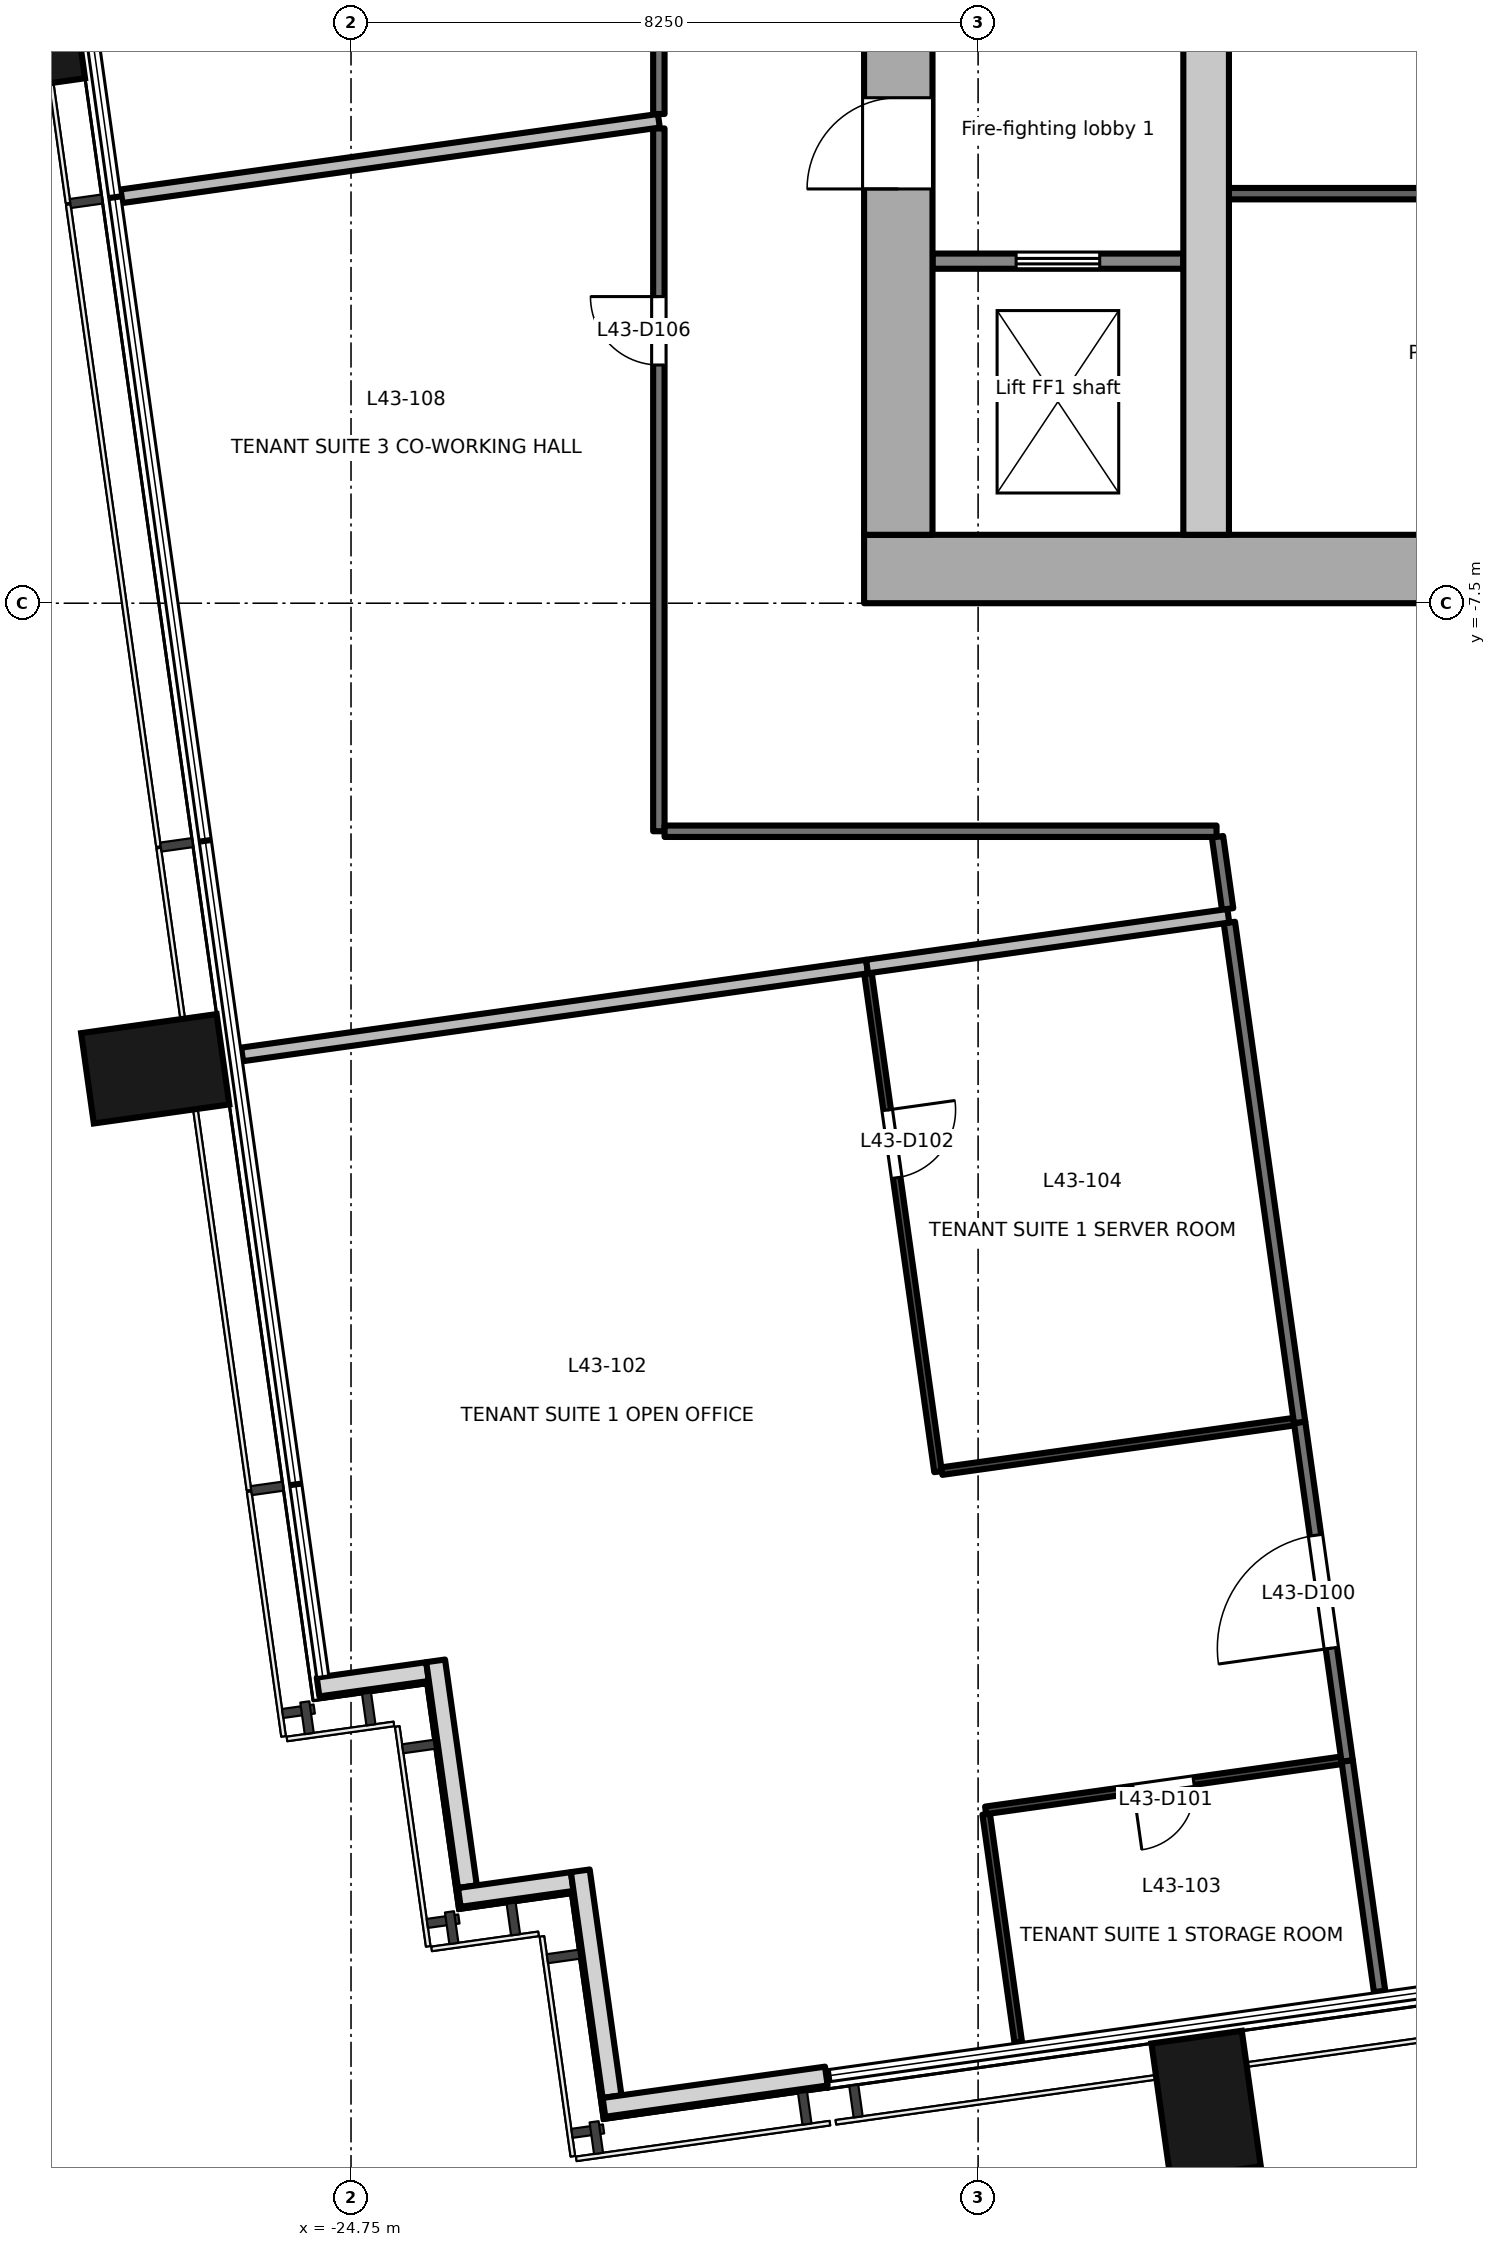
"""IFC4 building model, lengths in metres.
Left out: names, types, materials, properties, quantities, classifications, styles, units other than length and angle.
Written with IfcOpenShell. Run it as: python <this file> out.ifc"""

import sys

from ifc_helpers import new_model, si_unit, direction, frame, frame_2d, origin, origin_2d, place, context, subcontext, project, spatial, rectangle, extrude, element, fill, save


model = new_model("IFC4")
c1 = context("Model", 3, precision=1e-05, world=origin(), true_north=direction((0.0, 1.0)))
c2 = subcontext(c1, "Body", "Model", "MODEL_VIEW")
j1 = project(units=[si_unit("LENGTHUNIT", "METRE"), si_unit("PLANEANGLEUNIT", "RADIAN")], contexts=[c1])
p1 = place(None, origin())
s1 = spatial("IfcSite", under=j1, at=p1, CompositionType="ELEMENT")
p2 = place(p1, origin())
s2 = spatial("IfcBuilding", under=s1, at=p2, CompositionType="ELEMENT")
p3 = place(p2, frame((0.0, 0.0, 188.0)))
s3 = spatial("IfcBuildingStorey", under=s2, at=p3, CompositionType="ELEMENT", Elevation=188.0)
for number, where, z_axis, x_axis in (
    (1, (-13.5, -27.256, -0.2), (0.0, 0.0, 1.0), (0.99, 0.139, 0.0)),
    (2, (-27.326, -13.625, -0.2), (0.0, 0.0, 1.0), (-0.139, 0.99, 0.0)),
    (3, (-29.224, -0.125, -0.2), (0.0, 0.0, 1.0), (-0.139, 0.99, 0.0)),
):
    element("IfcColumn", number, at=place(p3, frame(where, z_axis=z_axis, x_axis=x_axis)), inside=s3, PredefinedType="COLUMN", context=c2, shape_type="SweptSolid", body=[
        extrude(rectangle(XDim=1.2, YDim=1.8, at=origin_2d()), origin(), (0.0, 0.0, 1.0), 3.9),
    ])
p4 = place(p3, frame((-25.184, -21.758, 0.0), z_axis=(0.0, 0.0, 1.0), x_axis=(0.9902493448, 0.13930626376, 0.0)))
e4 = element("IfcWall", 4, at=p4, inside=s3, PredefinedType="SOLIDWALL", context=c2, shape_type="SweptSolid", body=[
    extrude(rectangle(XDim=1.455, YDim=0.25, at=frame_2d((0.727, 0.0))), origin(), (0.0, 0.0, 1.0), 3.7),
])
p5 = place(p3, frame((-23.637, -21.414, 0.0), z_axis=(0.0, 0.0, 1.0), x_axis=(0.139313431826, -0.990248336385, 0.0)))
e5 = element("IfcWall", 5, at=p5, inside=s3, PredefinedType="SOLIDWALL", context=c2, shape_type="SweptSolid", body=[
    extrude(rectangle(XDim=3.0, YDim=0.25, at=frame_2d((1.5, 0.0))), origin(), (0.0, 0.0, 1.0), 3.7),
])
p6 = place(p3, frame((-23.325, -24.526, 0.0), z_axis=(0.0, 0.0, 1.0), x_axis=(0.990243596651, 0.13934711799, 0.0)))
e6 = element("IfcWall", 6, at=p6, inside=s3, PredefinedType="SOLIDWALL", context=c2, shape_type="SweptSolid", body=[
    extrude(rectangle(XDim=1.5, YDim=0.25, at=frame_2d((0.75, 0.0))), origin(), (0.0, 0.0, 1.0), 3.7),
])
p7 = place(p3, frame((-21.734, -24.176, 0.0), z_axis=(0.0, 0.0, 1.0), x_axis=(0.139313431826, -0.990248336385, 0.0)))
e7 = element("IfcWall", 7, at=p7, inside=s3, PredefinedType="SOLIDWALL", context=c2, shape_type="SweptSolid", body=[
    extrude(rectangle(XDim=3.0, YDim=0.25, at=frame_2d((1.5, 0.0))), origin(), (0.0, 0.0, 1.0), 3.7),
])
p8 = place(p3, frame((-21.422, -27.288, 0.0), z_axis=(0.0, 0.0, 1.0), x_axis=(0.990246427036, 0.139327002919, 0.0)))
e8 = element("IfcWall", 8, at=p8, inside=s3, PredefinedType="SOLIDWALL", context=c2, shape_type="SweptSolid", body=[
    extrude(rectangle(XDim=2.954, YDim=0.25, at=frame_2d((1.477, 0.0))), origin(), (0.0, 0.0, 1.0), 3.7),
])
p9 = place(p3, frame((-18.0, -7.05, -0.2), z_axis=(0.0, 0.0, 1.0), x_axis=(1.0, 0.0, 0.0)))
e9 = element("IfcWall", 9, at=p9, inside=s3, PredefinedType="SHEAR", context=c2, shape_type="SweptSolid", body=[
    extrude(rectangle(XDim=36.0, YDim=0.9, at=frame_2d((18.0, 0.0))), origin(), (0.0, 0.0, 1.0), 3.9),
])
p10 = place(p9, frame((11.3, 0.0, 0.2)))
e10 = element("IfcOpeningElement", 10, at=p10, cuts=e9, PredefinedType="OPENING", context=c2, shape_type="SweptSolid", body=[
    extrude(rectangle(XDim=1.8, YDim=2.1, at=frame_2d((0.9, 1.05))), frame((0.0, 0.46, 0.0), z_axis=(0.0, -1.0, 0.0), x_axis=(1.0, 0.0, 0.0)), (0.0, 0.0, 1.0), 0.921),
])
p11 = place(p9, frame((16.8, 0.0, 0.2)))
e11 = element("IfcOpeningElement", 11, at=p11, cuts=e9, PredefinedType="OPENING", context=c2, shape_type="SweptSolid", body=[
    extrude(rectangle(XDim=2.4, YDim=2.1, at=frame_2d((1.2, 1.05))), frame((0.0, 0.46, 0.0), z_axis=(0.0, -1.0, 0.0), x_axis=(1.0, 0.0, 0.0)), (0.0, 0.0, 1.0), 0.921),
])
p12 = place(p9, frame((26.1, 0.0, 0.2)))
e12 = element("IfcOpeningElement", 12, at=p12, cuts=e9, PredefinedType="OPENING", context=c2, shape_type="SweptSolid", body=[
    extrude(rectangle(XDim=2.4, YDim=2.1, at=frame_2d((1.2, 1.05))), frame((0.0, 0.46, 0.0), z_axis=(0.0, -1.0, 0.0), x_axis=(1.0, 0.0, 0.0)), (0.0, 0.0, 1.0), 0.921),
])
p13 = place(p3, frame((-17.55, -6.6, -0.2), z_axis=(0.0, 0.0, 1.0), x_axis=(0.0, 1.0, 0.0)))
e13 = element("IfcWall", 13, at=p13, inside=s3, PredefinedType="SHEAR", context=c2, shape_type="SweptSolid", body=[
    extrude(rectangle(XDim=13.2, YDim=0.9, at=frame_2d((6.6, 0.0))), origin(), (0.0, 0.0, 1.0), 3.9),
])
p14 = place(p13, frame((4.55, 0.0, 0.2)))
e14 = element("IfcOpeningElement", 14, at=p14, cuts=e13, PredefinedType="OPENING", context=c2, shape_type="SweptSolid", body=[
    extrude(rectangle(XDim=1.2, YDim=2.1, at=frame_2d((0.6, 1.05))), frame((0.0, 0.46, 0.0), z_axis=(0.0, -1.0, 0.0), x_axis=(1.0, 0.0, 0.0)), (0.0, 0.0, 1.0), 0.921),
])
p15 = place(p3, frame((-13.5, -6.6, -0.2), z_axis=(0.0, 0.0, 1.0), x_axis=(0.0, 1.0, 0.0)))
e15 = element("IfcWall", 15, at=p15, inside=s3, PredefinedType="SHEAR", context=c2, shape_type="SweptSolid", body=[
    extrude(rectangle(XDim=13.2, YDim=0.6, at=frame_2d((6.6, 0.0))), origin(), (0.0, 0.0, 1.0), 3.9),
])
p16 = place(p3, frame((-17.1, -3.0, 0.0), z_axis=(0.0, 0.0, 1.0), x_axis=(1.0, 0.0, 0.0)))
e16 = element("IfcWall", 16, at=p16, inside=s3, PredefinedType="PARTITIONING", context=c2, shape_type="SweptSolid", body=[
    extrude(rectangle(XDim=3.3, YDim=0.2, at=frame_2d((1.65, 0.0))), origin(), (0.0, 0.0, 1.0), 3.7),
])
p17 = place(p16, frame((1.1, 0.0, 0.0)))
e17 = element("IfcOpeningElement", 17, at=p17, cuts=e16, PredefinedType="OPENING", context=c2, shape_type="SweptSolid", body=[
    extrude(rectangle(XDim=1.1, YDim=2.1, at=frame_2d((0.55, 1.05))), frame((0.0, 0.111, 0.0), z_axis=(0.0, -1.0, 0.0), x_axis=(1.0, 0.0, 0.0)), (0.0, 0.0, 1.0), 0.221),
])
p18 = place(p3, frame((-13.2, -2.112, 0.0), z_axis=(0.0, 0.0, 1.0), x_axis=(1.0, 0.0, 0.0)))
e18 = element("IfcWall", 18, at=p18, inside=s3, PredefinedType="PARTITIONING", context=c2, shape_type="SweptSolid", body=[
    extrude(rectangle(XDim=6.25, YDim=0.15, at=frame_2d((3.125, 0.0))), origin(), (0.0, 0.0, 1.0), 3.7),
])
p19 = place(p3, frame((-11.644, -22.733, 0.0), z_axis=(0.0, 0.0, 1.0), x_axis=(-0.139081954514, 0.990280874262, 0.0)))
e19 = element("IfcWall", 19, at=p19, inside=s3, PredefinedType="PARTITIONING", context=c2, shape_type="SweptSolid", body=[
    extrude(rectangle(XDim=4.501, YDim=0.15, at=frame_2d((2.25, 0.0))), origin(), (0.0, 0.0, 1.0), 3.7),
])
p20 = place(p19, frame((1.5, 0.0, 0.0)))
e20 = element("IfcOpeningElement", 20, at=p20, cuts=e19, PredefinedType="OPENING", context=c2, shape_type="SweptSolid", body=[
    extrude(rectangle(XDim=1.5, YDim=2.1, at=frame_2d((0.75, 1.05))), frame((0.0, 0.085, 0.0), z_axis=(0.0, -1.0, 0.0), x_axis=(1.0, 0.0, 0.0)), (0.0, 0.0, 1.0), 0.171),
])
p21 = place(p3, frame((-11.218, -25.763, 0.0), z_axis=(0.0, 0.0, 1.0), x_axis=(-0.139187613425, 0.990266029039, 0.0)))
e21 = element("IfcWall", 21, at=p21, inside=s3, PredefinedType="PARTITIONING", context=c2, shape_type="SweptSolid", body=[
    extrude(rectangle(XDim=3.061, YDim=0.15, at=frame_2d((1.53, 0.0))), origin(), (0.0, 0.0, 1.0), 3.7),
])
p22 = place(p3, frame((-12.27, -18.277, 0.0), z_axis=(0.0, 0.0, 1.0), x_axis=(-0.139151184207, 0.990271148693, 0.0)))
e22 = element("IfcWall", 22, at=p22, inside=s3, PredefinedType="PARTITIONING", context=c2, shape_type="SweptSolid", body=[
    extrude(rectangle(XDim=6.641, YDim=0.15, at=frame_2d((3.32, 0.0))), origin(), (0.0, 0.0, 1.0), 3.7),
])
p23 = place(p3, frame((-20.7, -10.5, 0.0), z_axis=(0.0, 0.0, 1.0), x_axis=(0.0, 1.0, 0.0)))
e23 = element("IfcWall", 23, at=p23, inside=s3, PredefinedType="PARTITIONING", context=c2, shape_type="SweptSolid", body=[
    extrude(rectangle(XDim=9.246, YDim=0.15, at=frame_2d((4.623, 0.0))), origin(), (0.0, 0.0, 1.0), 3.25),
])
p24 = place(p23, frame((6.134, 0.0, 0.0)))
e24 = element("IfcOpeningElement", 24, at=p24, cuts=e23, PredefinedType="OPENING", context=c2, shape_type="SweptSolid", body=[
    extrude(rectangle(XDim=0.9, YDim=2.1, at=frame_2d((0.45, 1.05))), frame((0.0, 0.085, 0.0), z_axis=(0.0, -1.0, 0.0), x_axis=(1.0, 0.0, 0.0)), (0.0, 0.0, 1.0), 0.171),
])
p25 = place(p3, frame((-13.363, -10.5, 0.0), z_axis=(0.0, 0.0, 1.0), x_axis=(-1.0, 0.0, 0.0)))
e25 = element("IfcWall", 25, at=p25, inside=s3, PredefinedType="PARTITIONING", context=c2, shape_type="SweptSolid", body=[
    extrude(rectangle(XDim=7.262, YDim=0.15, at=frame_2d((3.631, 0.0))), origin(), (0.0, 0.0, 1.0), 2.8),
])
p26 = place(p3, frame((-13.217, -11.522, 0.0), z_axis=(0.0, 0.0, 1.0), x_axis=(-0.138852741578, 0.990313039476, 0.0)))
e26 = element("IfcWall", 26, at=p26, inside=s3, PredefinedType="PARTITIONING", context=c2, shape_type="SweptSolid", body=[
    extrude(rectangle(XDim=0.958, YDim=0.15, at=frame_2d((0.479, 0.0))), origin(), (0.0, 0.0, 1.0), 2.8),
])
p27 = place(p3, frame((-20.7, -1.064, 0.0), z_axis=(0.0, 0.0, 1.0), x_axis=(0.0, 1.0, 0.0)))
e27 = element("IfcWall", 27, at=p27, inside=s3, PredefinedType="PARTITIONING", context=c2, shape_type="SweptSolid", body=[
    extrude(rectangle(XDim=8.564, YDim=0.15, at=frame_2d((4.282, 0.0))), origin(), (0.0, 0.0, 1.0), 3.2),
])
p28 = place(p27, frame((3.382, 0.0, 0.0)))
e28 = element("IfcOpeningElement", 28, at=p28, cuts=e27, PredefinedType="OPENING", context=c2, shape_type="SweptSolid", body=[
    extrude(rectangle(XDim=1.8, YDim=2.1, at=frame_2d((0.9, 1.05))), frame((0.0, 0.085, 0.0), z_axis=(0.0, -1.0, 0.0), x_axis=(1.0, 0.0, 0.0)), (0.0, 0.0, 1.0), 0.171),
])
p29 = place(p3, frame((-16.394, -23.431, 0.0), z_axis=(0.0, 0.0, 1.0), x_axis=(0.139333854614, -0.990245462983, 0.0)))
e29 = element("IfcWall", 29, at=p29, inside=s3, PredefinedType="PARTITIONING", context=c2, shape_type="SweptSolid", body=[
    extrude(rectangle(XDim=3.03, YDim=0.1, at=frame_2d((1.515, 0.0))), origin(), (0.0, 0.0, 1.0), 3.7),
])
p30 = place(p3, frame((-11.721, -22.723, 0.0), z_axis=(0.0, 0.0, 1.0), x_axis=(-0.990254018594, -0.139273036368, 0.0)))
e30 = element("IfcWall", 30, at=p30, inside=s3, PredefinedType="PARTITIONING", context=c2, shape_type="SweptSolid", body=[
    extrude(rectangle(XDim=4.726, YDim=0.1, at=frame_2d((2.363, 0.0))), origin(), (0.0, 0.0, 1.0), 2.8),
])
p31 = place(p30, frame((1.963, 0.0, 0.0)))
e31 = element("IfcOpeningElement", 31, at=p31, cuts=e30, PredefinedType="OPENING", context=c2, shape_type="SweptSolid", body=[
    extrude(rectangle(XDim=0.8, YDim=2.1, at=frame_2d((0.4, 1.05))), frame((0.0, 0.061, 0.0), z_axis=(0.0, -1.0, 0.0), x_axis=(1.0, 0.0, 0.0)), (0.0, 0.0, 1.0), 0.121),
])
p32 = place(p3, frame((-17.949, -12.369, 0.0), z_axis=(0.0, 0.0, 1.0), x_axis=(0.1392424012, -0.990258326755, 0.0)))
e32 = element("IfcWall", 32, at=p32, inside=s3, PredefinedType="PARTITIONING", context=c2, shape_type="SweptSolid", body=[
    extrude(rectangle(XDim=6.621, YDim=0.1, at=frame_2d((3.31, 0.0))), origin(), (0.0, 0.0, 1.0), 3.7),
])
p33 = place(p32, frame((1.816, 0.0, 0.0)))
e33 = element("IfcOpeningElement", 33, at=p33, cuts=e32, PredefinedType="OPENING", context=c2, shape_type="SweptSolid", body=[
    extrude(rectangle(XDim=0.9, YDim=2.1, at=frame_2d((0.45, 1.05))), frame((0.0, 0.061, 0.0), z_axis=(0.0, -1.0, 0.0), x_axis=(1.0, 0.0, 0.0)), (0.0, 0.0, 1.0), 0.121),
])
p34 = place(p3, frame((-16.977, -18.918, 0.0), z_axis=(0.0, 0.0, 1.0), x_axis=(0.990292211818, 0.139001205793, 0.0)))
e34 = element("IfcWall", 34, at=p34, inside=s3, PredefinedType="PARTITIONING", context=c2, shape_type="SweptSolid", body=[
    extrude(rectangle(XDim=4.676, YDim=0.1, at=frame_2d((2.338, 0.0))), origin(), (0.0, 0.0, 1.0), 2.8),
])
p35 = place(p3, frame((-26.183, -13.436, 0.0), z_axis=(0.0, 0.0, 1.0), x_axis=(0.990260506457, 0.139226898809, 0.0)))
e35 = element("IfcWall", 35, at=p35, inside=s3, PredefinedType="PARTITIONING", context=c2, shape_type="SweptSolid", body=[
    extrude(rectangle(XDim=8.303, YDim=0.18, at=frame_2d((4.151, 0.0))), origin(), (0.0, 0.0, 1.0), 3.7),
])
p36 = place(p3, frame((-17.961, -12.28, 0.0), z_axis=(0.0, 0.0, 1.0), x_axis=(0.990268412035, 0.139170658277, 0.0)))
e36 = element("IfcWall", 36, at=p36, inside=s3, PredefinedType="PARTITIONING", context=c2, shape_type="SweptSolid", body=[
    extrude(rectangle(XDim=4.8, YDim=0.18, at=frame_2d((2.4, 0.0))), origin(), (0.0, 0.0, 1.0), 2.8),
])
p37 = place(p3, frame((-27.769, -2.146, 0.0), z_axis=(0.0, 0.0, 1.0), x_axis=(0.990279188786, 0.139093954785, 0.0)))
e37 = element("IfcWall", 37, at=p37, inside=s3, PredefinedType="PARTITIONING", context=c2, shape_type="SweptSolid", body=[
    extrude(rectangle(XDim=7.138, YDim=0.18, at=frame_2d((3.569, 0.0))), origin(), (0.0, 0.0, 1.0), 3.7),
])
p38 = place(p17, origin())
e38 = element("IfcDoor", 38, at=p38, inside=s3, OperationType="DOUBLE_DOOR_SLIDING", PredefinedType="DOOR", context=c2, shape_type="SweptSolid", body=[
    extrude(rectangle(XDim=1.1, YDim=2.1, at=frame_2d((0.55, 1.05))), frame((0.0, 0.025, 0.0), z_axis=(0.0, -1.0, 0.0), x_axis=(1.0, 0.0, 0.0)), (0.0, 0.0, 1.0), 0.05),
])
fill(e17, e38)
p39 = place(p14, origin())
e39 = element("IfcDoor", 39, at=p39, inside=s3, OperationType="SINGLE_SWING_LEFT", PredefinedType="DOOR", context=c2, shape_type="SweptSolid", body=[
    extrude(rectangle(XDim=1.2, YDim=2.1, at=frame_2d((0.6, 1.05))), frame((0.0, 0.025, 0.0), z_axis=(0.0, -1.0, 0.0), x_axis=(1.0, 0.0, 0.0)), (0.0, 0.0, 1.0), 0.05),
])
fill(e14, e39)
p40 = place(p20, origin())
e40 = element("IfcDoor", 40, at=p40, inside=s3, OperationType="DOUBLE_DOOR_SINGLE_SWING", PredefinedType="DOOR", context=c2, shape_type="SweptSolid", body=[
    extrude(rectangle(XDim=1.5, YDim=2.1, at=frame_2d((0.75, 1.05))), frame((0.0, 0.025, 0.0), z_axis=(0.0, -1.0, 0.0), x_axis=(1.0, 0.0, 0.0)), (0.0, 0.0, 1.0), 0.05),
])
fill(e20, e40)
p41 = place(p31, origin())
e41 = element("IfcDoor", 41, at=p41, inside=s3, OperationType="SINGLE_SWING_RIGHT", PredefinedType="DOOR", context=c2, shape_type="SweptSolid", body=[
    extrude(rectangle(XDim=0.8, YDim=2.1, at=frame_2d((0.4, 1.05))), frame((0.0, 0.025, 0.0), z_axis=(0.0, -1.0, 0.0), x_axis=(1.0, 0.0, 0.0)), (0.0, 0.0, 1.0), 0.05),
])
fill(e31, e41)
p42 = place(p33, origin())
e42 = element("IfcDoor", 42, at=p42, inside=s3, OperationType="SINGLE_SWING_LEFT", PredefinedType="DOOR", context=c2, shape_type="SweptSolid", body=[
    extrude(rectangle(XDim=0.9, YDim=2.1, at=frame_2d((0.45, 1.05))), frame((0.0, 0.025, 0.0), z_axis=(0.0, -1.0, 0.0), x_axis=(1.0, 0.0, 0.0)), (0.0, 0.0, 1.0), 0.05),
])
fill(e33, e42)
p43 = place(p24, origin())
e43 = element("IfcDoor", 43, at=p43, inside=s3, OperationType="SINGLE_SWING_RIGHT", PredefinedType="DOOR", context=c2, shape_type="SweptSolid", body=[
    extrude(rectangle(XDim=0.9, YDim=2.1, at=frame_2d((0.45, 1.05))), frame((0.0, 0.025, 0.0), z_axis=(0.0, -1.0, 0.0), x_axis=(1.0, 0.0, 0.0)), (0.0, 0.0, 1.0), 0.05),
])
fill(e24, e43)
save(model, sys.argv[1])
